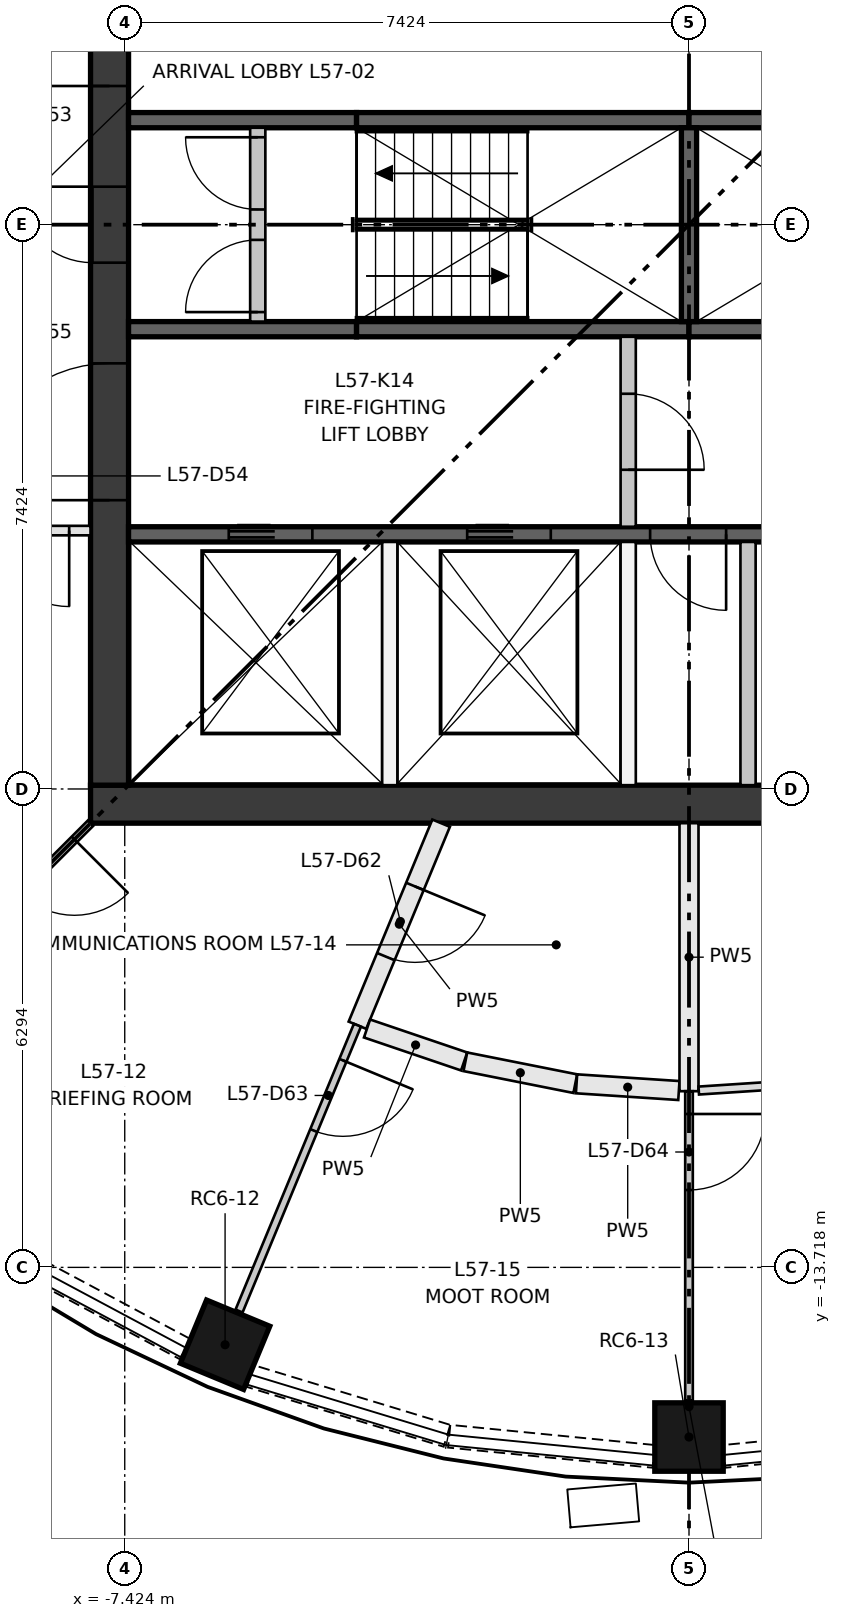
"""IFC4 building model, lengths in metres.
Left out: names, types, materials, properties, quantities, classifications, styles, units other than length and angle.
Written with IfcOpenShell. Run it as: python <this file> out.ifc"""

import sys

from ifc_helpers import new_model, si_unit, direction, frame, frame_2d, origin, origin_2d, place, context, subcontext, project, spatial, rectangle, extrude, element, fill, save


model = new_model("IFC4")
c1 = context("Model", 3, precision=1e-05, world=origin(), true_north=direction((0.0, 1.0)))
c2 = subcontext(c1, "Body", "Model", "MODEL_VIEW")
j1 = project(units=[si_unit("LENGTHUNIT", "METRE"), si_unit("PLANEANGLEUNIT", "RADIAN")], contexts=[c1])
p1 = place(None, origin())
s1 = spatial("IfcSite", under=j1, at=p1, CompositionType="ELEMENT")
p2 = place(p1, origin())
s2 = spatial("IfcBuilding", under=s1, at=p2, CompositionType="ELEMENT")
p3 = place(p2, frame((0.0, 0.0, 211.1)))
s3 = spatial("IfcBuildingStorey", under=s2, at=p3, CompositionType="ELEMENT", Elevation=211.1)
for number, where, z_axis, x_axis in (
    (1, (-6.104, -14.736, 0.0), (0.0, 0.0, 1.0), (-0.383, -0.924, 0.0)),
    (2, (0.0, -15.95, 0.0), (0.0, 0.0, 1.0), (0.0, -1.0, 0.0)),
):
    element("IfcColumn", number, at=place(p3, frame(where, z_axis=z_axis, x_axis=x_axis)), inside=s3, PredefinedType="COLUMN", context=c2, shape_type="SweptSolid", body=[
        extrude(rectangle(XDim=0.9, YDim=0.9, at=origin_2d()), origin(), (0.0, 0.0, 1.0), 2.85),
    ])
p4 = place(p3, frame((-7.874, -7.624, 0.0), z_axis=(0.0, 0.0, 1.0), x_axis=(1.0, 0.0, 0.0)))
e3 = element("IfcWall", 3, at=p4, inside=s3, PredefinedType="SHEAR", context=c2, shape_type="SweptSolid", body=[
    extrude(rectangle(XDim=15.748, YDim=0.5, at=frame_2d((7.874, 0.0))), origin(), (0.0, 0.0, 1.0), 3.35),
])
p5 = place(p3, frame((-7.624, -7.374, 0.0), z_axis=(0.0, 0.0, 1.0), x_axis=(0.0, 1.0, 0.0)))
e4 = element("IfcWall", 4, at=p5, inside=s3, PredefinedType="SHEAR", context=c2, shape_type="SweptSolid", body=[
    extrude(rectangle(XDim=14.748, YDim=0.5, at=frame_2d((7.374, 0.0))), origin(), (0.0, 0.0, 1.0), 3.35),
])
p6 = place(p5, frame((6.874, 0.0, 0.0)))
e5 = element("IfcOpeningElement", 5, at=p6, cuts=e4, PredefinedType="OPENING", context=c2, shape_type="SweptSolid", body=[
    extrude(rectangle(XDim=1.0, YDim=2.1, at=frame_2d((0.5, 1.05))), frame((0.0, 0.26, 0.0), z_axis=(0.0, -1.0, 0.0), x_axis=(1.0, 0.0, 0.0)), (0.0, 0.0, 1.0), 0.52),
])
p7 = place(p5, frame((3.75, 0.0, 0.0)))
e6 = element("IfcOpeningElement", 6, at=p7, cuts=e4, PredefinedType="OPENING", context=c2, shape_type="SweptSolid", body=[
    extrude(rectangle(XDim=1.8, YDim=2.1, at=frame_2d((0.9, 1.05))), frame((0.0, 0.26, 0.0), z_axis=(0.0, -1.0, 0.0), x_axis=(1.0, 0.0, 0.0)), (0.0, 0.0, 1.0), 0.52),
])
p8 = place(p5, frame((9.198, 0.0, 0.0)))
e7 = element("IfcOpeningElement", 7, at=p8, cuts=e4, PredefinedType="OPENING", context=c2, shape_type="SweptSolid", body=[
    extrude(rectangle(XDim=1.8, YDim=2.1, at=frame_2d((0.9, 1.05))), frame((0.0, 0.26, 0.0), z_axis=(0.0, -1.0, 0.0), x_axis=(1.0, 0.0, 0.0)), (0.0, 0.0, 1.0), 0.52),
])
p9 = place(p3, frame((-7.374, -4.074, 0.0), z_axis=(0.0, 0.0, 1.0), x_axis=(1.0, 0.0, 0.0)))
e8 = element("IfcWall", 8, at=p9, inside=s3, PredefinedType="SHEAR", context=c2, shape_type="SweptSolid", body=[
    extrude(rectangle(XDim=14.748, YDim=0.2, at=frame_2d((7.374, 0.0))), origin(), (0.0, 0.0, 1.0), 3.0),
])
p10 = place(p9, frame((1.319, 0.0, 0.0)))
e9 = element("IfcOpeningElement", 9, at=p10, cuts=e8, PredefinedType="OPENING", context=c2, shape_type="SweptSolid", body=[
    extrude(rectangle(XDim=1.1, YDim=2.1, at=frame_2d((0.55, 1.05))), frame((0.0, 0.11, 0.0), z_axis=(0.0, -1.0, 0.0), x_axis=(1.0, 0.0, 0.0)), (0.0, 0.0, 1.0), 0.22),
])
p11 = place(p9, frame((4.456, 0.0, 0.0)))
e10 = element("IfcOpeningElement", 10, at=p11, cuts=e8, PredefinedType="OPENING", context=c2, shape_type="SweptSolid", body=[
    extrude(rectangle(XDim=1.1, YDim=2.1, at=frame_2d((0.55, 1.05))), frame((0.0, 0.11, 0.0), z_axis=(0.0, -1.0, 0.0), x_axis=(1.0, 0.0, 0.0)), (0.0, 0.0, 1.0), 0.22),
])
p12 = place(p9, frame((6.862, 0.0, 0.0)))
e11 = element("IfcOpeningElement", 11, at=p12, cuts=e8, PredefinedType="OPENING", context=c2, shape_type="SweptSolid", body=[
    extrude(rectangle(XDim=1.0, YDim=2.1, at=frame_2d((0.5, 1.05))), frame((0.0, 0.11, 0.0), z_axis=(0.0, -1.0, 0.0), x_axis=(1.0, 0.0, 0.0)), (0.0, 0.0, 1.0), 0.22),
])
p13 = place(p9, frame((8.439, 0.0, 0.0)))
e12 = element("IfcOpeningElement", 12, at=p13, cuts=e8, PredefinedType="OPENING", context=c2, shape_type="SweptSolid", body=[
    extrude(rectangle(XDim=1.0, YDim=2.1, at=frame_2d((0.5, 1.05))), frame((0.0, 0.11, 0.0), z_axis=(0.0, -1.0, 0.0), x_axis=(1.0, 0.0, 0.0)), (0.0, 0.0, 1.0), 0.22),
])
p14 = place(p9, frame((10.509, 0.0, 0.0)))
e13 = element("IfcOpeningElement", 13, at=p14, cuts=e8, PredefinedType="OPENING", context=c2, shape_type="SweptSolid", body=[
    extrude(rectangle(XDim=0.8, YDim=2.1, at=frame_2d((0.4, 1.05))), frame((0.0, 0.11, 0.0), z_axis=(0.0, -1.0, 0.0), x_axis=(1.0, 0.0, 0.0)), (0.0, 0.0, 1.0), 0.22),
])
p15 = place(p9, frame((12.969, 0.0, 0.0)))
e14 = element("IfcOpeningElement", 14, at=p15, cuts=e8, PredefinedType="OPENING", context=c2, shape_type="SweptSolid", body=[
    extrude(rectangle(XDim=1.0, YDim=2.1, at=frame_2d((0.5, 1.05))), frame((0.0, 0.11, 0.0), z_axis=(0.0, -1.0, 0.0), x_axis=(1.0, 0.0, 0.0)), (0.0, 0.0, 1.0), 0.22),
])
p16 = place(p3, frame((-7.374, -1.375, 0.0), z_axis=(0.0, 0.0, 1.0), x_axis=(1.0, 0.0, 0.0)))
e15 = element("IfcWall", 15, at=p16, inside=s3, PredefinedType="SHEAR", context=c2, shape_type="SweptSolid", body=[
    extrude(rectangle(XDim=3.0, YDim=0.2, at=frame_2d((1.5, 0.0))), origin(), (0.0, 0.0, 1.0), 3.0),
])
for number, where, z_axis, x_axis in (
    (16, (-4.374, -1.375, 0.0), (0.0, 0.0, 1.0), (1.0, 0.0, 0.0)),
    (17, (0.0, -1.375, 0.0), (0.0, 0.0, 1.0), (1.0, 0.0, 0.0)),
):
    element("IfcWall", number, at=place(p3, frame(where, z_axis=z_axis, x_axis=x_axis)), inside=s3, PredefinedType="SHEAR", context=c2, shape_type="SweptSolid", body=[
        extrude(rectangle(XDim=4.374, YDim=0.2, at=frame_2d((2.187, 0.0))), origin(), (0.0, 0.0, 1.0), 3.0),
    ])
p17 = place(p3, frame((-7.374, 1.375, 0.0), z_axis=(0.0, 0.0, 1.0), x_axis=(1.0, 0.0, 0.0)))
e18 = element("IfcWall", 18, at=p17, inside=s3, PredefinedType="SHEAR", context=c2, shape_type="SweptSolid", body=[
    extrude(rectangle(XDim=3.0, YDim=0.2, at=frame_2d((1.5, 0.0))), origin(), (0.0, 0.0, 1.0), 3.0),
])
for number, where, z_axis, x_axis in (
    (19, (-4.374, 1.375, 0.0), (0.0, 0.0, 1.0), (1.0, 0.0, 0.0)),
    (20, (0.0, 1.375, 0.0), (0.0, 0.0, 1.0), (1.0, 0.0, 0.0)),
):
    element("IfcWall", number, at=place(p3, frame(where, z_axis=z_axis, x_axis=x_axis)), inside=s3, PredefinedType="SHEAR", context=c2, shape_type="SweptSolid", body=[
        extrude(rectangle(XDim=4.374, YDim=0.2, at=frame_2d((2.187, 0.0))), origin(), (0.0, 0.0, 1.0), 3.0),
    ])
p18 = place(p3, frame((0.0, -1.275, 0.0), z_axis=(0.0, 0.0, 1.0), x_axis=(0.0, 1.0, 0.0)))
e21 = element("IfcWall", 21, at=p18, inside=s3, PredefinedType="SHEAR", context=c2, shape_type="SweptSolid", body=[
    extrude(rectangle(XDim=2.55, YDim=0.2, at=frame_2d((1.275, 0.0))), origin(), (0.0, 0.0, 1.0), 3.0),
])
for number, where, z_axis, x_axis in (
    (22, (-3.937, -7.374, 0.0), (0.0, 0.0, 1.0), (0.0, 1.0, 0.0)),
    (23, (-0.8, -7.374, 0.0), (0.0, 0.0, 1.0), (0.0, 1.0, 0.0)),
):
    element("IfcWall", number, at=place(p3, frame(where, z_axis=z_axis, x_axis=x_axis)), inside=s3, PredefinedType="PARTITIONING", context=c2, shape_type="SweptSolid", body=[
        extrude(rectangle(XDim=3.2, YDim=0.2, at=frame_2d((1.6, 0.0))), origin(), (0.0, 0.0, 1.0), 3.0),
    ])
p19 = place(p3, frame((-0.8, -3.974, 0.0), z_axis=(0.0, 0.0, 1.0), x_axis=(0.0, 1.0, 0.0)))
e24 = element("IfcWall", 24, at=p19, inside=s3, PredefinedType="PARTITIONING", context=c2, shape_type="SweptSolid", body=[
    extrude(rectangle(XDim=2.499, YDim=0.2, at=frame_2d((1.25, 0.0))), origin(), (0.0, 0.0, 1.0), 3.0),
])
p20 = place(p19, frame((0.75, 0.0, 0.0)))
e25 = element("IfcOpeningElement", 25, at=p20, cuts=e24, PredefinedType="OPENING", context=c2, shape_type="SweptSolid", body=[
    extrude(rectangle(XDim=1.0, YDim=2.1, at=frame_2d((0.5, 1.05))), frame((0.0, 0.11, 0.0), z_axis=(0.0, -1.0, 0.0), x_axis=(1.0, 0.0, 0.0)), (0.0, 0.0, 1.0), 0.22),
])
p21 = place(p3, frame((0.777, -7.374, 0.0), z_axis=(0.0, 0.0, 1.0), x_axis=(0.0, 1.0, 0.0)))
e26 = element("IfcWall", 26, at=p21, inside=s3, PredefinedType="PARTITIONING", context=c2, shape_type="SweptSolid", body=[
    extrude(rectangle(XDim=3.2, YDim=0.2, at=frame_2d((1.6, 0.0))), origin(), (0.0, 0.0, 1.0), 3.0),
])
p22 = place(p3, frame((-5.674, -1.275, 0.0), z_axis=(0.0, 0.0, 1.0), x_axis=(0.0, 1.0, 0.0)))
e27 = element("IfcWall", 27, at=p22, inside=s3, PredefinedType="PARTITIONING", context=c2, shape_type="SweptSolid", body=[
    extrude(rectangle(XDim=2.55, YDim=0.2, at=frame_2d((1.275, 0.0))), origin(), (0.0, 0.0, 1.0), 3.0),
])
p23 = place(p22, frame((0.125, 0.0, 0.0)))
e28 = element("IfcOpeningElement", 28, at=p23, cuts=e27, PredefinedType="OPENING", context=c2, shape_type="SweptSolid", body=[
    extrude(rectangle(XDim=0.95, YDim=2.1, at=frame_2d((0.475, 1.05))), frame((0.0, 0.11, 0.0), z_axis=(0.0, -1.0, 0.0), x_axis=(1.0, 0.0, 0.0)), (0.0, 0.0, 1.0), 0.22),
])
p24 = place(p22, frame((1.475, 0.0, 0.0)))
e29 = element("IfcOpeningElement", 29, at=p24, cuts=e27, PredefinedType="OPENING", context=c2, shape_type="SweptSolid", body=[
    extrude(rectangle(XDim=0.95, YDim=2.1, at=frame_2d((0.475, 1.05))), frame((0.0, 0.11, 0.0), z_axis=(0.0, -1.0, 0.0), x_axis=(1.0, 0.0, 0.0)), (0.0, 0.0, 1.0), 0.22),
])
p25 = place(p3, frame((-9.015, -13.518, 0.0), z_axis=(0.0, 0.0, 1.0), x_axis=(0.881887660835, -0.471459599189, 0.0)))
e30 = element("IfcWall", 30, at=p25, inside=s3, PredefinedType="SOLIDWALL", context=c2, shape_type="SweptSolid", body=[
    extrude(rectangle(XDim=2.704, YDim=0.3, at=frame_2d((1.352, 0.0))), origin(), (0.0, 0.0, 1.0), 0.9),
])
p26 = place(p3, frame((-5.773, -15.147, 0.0), z_axis=(0.0, 0.0, 1.0), x_axis=(0.956842043529, -0.290608505958, 0.0)))
e31 = element("IfcWall", 31, at=p26, inside=s3, PredefinedType="SOLIDWALL", context=c2, shape_type="SweptSolid", body=[
    extrude(rectangle(XDim=2.705, YDim=0.3, at=frame_2d((1.353, 0.0))), origin(), (0.0, 0.0, 1.0), 0.9),
])
for number, where, z_axis, x_axis in (
    (32, (-3.155, -15.939, 0.0), (0.0, 0.0, 1.0), (0.995, -0.098, 0.0)),
    (33, (0.464, -16.205, 0.0), (0.0, 0.0, 1.0), (0.995, 0.098, 0.0)),
):
    element("IfcWall", number, at=place(p3, frame(where, z_axis=z_axis, x_axis=x_axis)), inside=s3, PredefinedType="SOLIDWALL", context=c2, shape_type="SweptSolid", body=[
        extrude(rectangle(XDim=2.704, YDim=0.3, at=frame_2d((1.352, 0.0))), origin(), (0.0, 0.0, 1.0), 0.9),
    ])
p27 = place(p3, frame((-7.874, -4.024, 0.0), z_axis=(0.0, 0.0, 1.0), x_axis=(-1.0, 0.0, 0.0)))
e34 = element("IfcWall", 34, at=p27, inside=s3, PredefinedType="PARTITIONING", context=c2, shape_type="SweptSolid", body=[
    extrude(rectangle(XDim=1.562, YDim=0.125, at=frame_2d((0.781, 0.0))), origin(), (0.0, 0.0, 1.0), 3.0),
])
p28 = place(p27, frame((0.281, 0.0, 0.0)))
e35 = element("IfcOpeningElement", 35, at=p28, cuts=e34, PredefinedType="OPENING", context=c2, shape_type="SweptSolid", body=[
    extrude(rectangle(XDim=1.0, YDim=2.1, at=frame_2d((0.5, 1.05))), frame((0.0, 0.073, 0.0), z_axis=(0.0, -1.0, 0.0), x_axis=(1.0, 0.0, 0.0)), (0.0, 0.0, 1.0), 0.145),
])
p29 = place(p3, frame((-7.874, -7.874, 0.0), z_axis=(0.0, 0.0, 1.0), x_axis=(-0.707106781187, -0.707106781187, 0.0)))
e36 = element("IfcWall", 36, at=p29, inside=s3, PredefinedType="PARTITIONING", context=c2, shape_type="SweptSolid", body=[
    extrude(rectangle(XDim=4.334, YDim=0.1, at=frame_2d((2.167, 0.0))), origin(), (0.0, 0.0, 1.0), 3.0),
])
p30 = place(p29, frame((0.3, 0.0, 0.0)))
e37 = element("IfcOpeningElement", 37, at=p30, cuts=e36, PredefinedType="OPENING", context=c2, shape_type="SweptSolid", body=[
    extrude(rectangle(XDim=1.0, YDim=2.1, at=frame_2d((0.5, 1.05))), frame((0.0, 0.06, 0.0), z_axis=(0.0, -1.0, 0.0), x_axis=(1.0, 0.0, 0.0)), (0.0, 0.0, 1.0), 0.12),
])
p31 = place(p3, frame((-3.261, -7.874, 0.0), z_axis=(0.0, 0.0, 1.0), x_axis=(-0.382686527355, -0.923878250519, 0.0)))
e38 = element("IfcWall", 38, at=p31, inside=s3, PredefinedType="PARTITIONING", context=c2, shape_type="SweptSolid", body=[
    extrude(rectangle(XDim=2.877, YDim=0.25, at=frame_2d((1.438, 0.0))), origin(), (0.0, 0.0, 1.0), 3.0),
])
p32 = place(p31, frame((0.9, 0.0, 0.0)))
e39 = element("IfcOpeningElement", 39, at=p32, cuts=e38, PredefinedType="OPENING", context=c2, shape_type="SweptSolid", body=[
    extrude(rectangle(XDim=1.0, YDim=2.1, at=frame_2d((0.5, 1.05))), frame((0.0, 0.135, 0.0), z_axis=(0.0, -1.0, 0.0), x_axis=(1.0, 0.0, 0.0)), (0.0, 0.0, 1.0), 0.27),
])
p33 = place(p3, frame((-4.363, -10.532, 0.0), z_axis=(0.0, 0.0, 1.0), x_axis=(-0.382697907061, -0.923873536763, 0.0)))
e40 = element("IfcWall", 40, at=p33, inside=s3, PredefinedType="PARTITIONING", context=c2, shape_type="SweptSolid", body=[
    extrude(rectangle(XDim=4.07, YDim=0.1, at=frame_2d((2.035, 0.0))), origin(), (0.0, 0.0, 1.0), 3.0),
])
p34 = place(p33, frame((0.5, 0.0, 0.0)))
e41 = element("IfcOpeningElement", 41, at=p34, cuts=e40, PredefinedType="OPENING", context=c2, shape_type="SweptSolid", body=[
    extrude(rectangle(XDim=1.0, YDim=2.1, at=frame_2d((0.5, 1.05))), frame((0.0, 0.06, 0.0), z_axis=(0.0, -1.0, 0.0), x_axis=(1.0, 0.0, 0.0)), (0.0, 0.0, 1.0), 0.12),
])
p35 = place(p3, frame((-2.958, -11.009, 0.0), z_axis=(0.0, 0.0, 1.0), x_axis=(-0.946913805822, 0.321487549283, 0.0)))
e42 = element("IfcWall", 42, at=p35, inside=s3, PredefinedType="PARTITIONING", context=c2, shape_type="SweptSolid", body=[
    extrude(rectangle(XDim=1.349, YDim=0.25, at=frame_2d((0.675, 0.0))), origin(), (0.0, 0.0, 1.0), 3.0),
])
p36 = place(p3, frame((-1.496, -11.301, 0.0), z_axis=(0.0, 0.0, 1.0), x_axis=(-0.980796583917, 0.195033486809, 0.0)))
e43 = element("IfcWall", 43, at=p36, inside=s3, PredefinedType="PARTITIONING", context=c2, shape_type="SweptSolid", body=[
    extrude(rectangle(XDim=1.475, YDim=0.25, at=frame_2d((0.737, 0.0))), origin(), (0.0, 0.0, 1.0), 3.0),
])
p37 = place(p3, frame((-0.133, -11.391, 0.0), z_axis=(0.0, 0.0, 1.0), x_axis=(-0.997852686239, 0.065498218027, 0.0)))
e44 = element("IfcWall", 44, at=p37, inside=s3, PredefinedType="PARTITIONING", context=c2, shape_type="SweptSolid", body=[
    extrude(rectangle(XDim=1.349, YDim=0.25, at=frame_2d((0.675, 0.0))), origin(), (0.0, 0.0, 1.0), 3.0),
])
p38 = place(p3, frame((0.0, -7.874, 0.0), z_axis=(0.0, 0.0, 1.0), x_axis=(0.0, -1.0, 0.0)))
e45 = element("IfcWall", 45, at=p38, inside=s3, PredefinedType="PARTITIONING", context=c2, shape_type="SweptSolid", body=[
    extrude(rectangle(XDim=3.526, YDim=0.25, at=frame_2d((1.763, 0.0))), origin(), (0.0, 0.0, 1.0), 3.0),
])
p39 = place(p3, frame((0.0, -11.4, 0.0), z_axis=(0.0, 0.0, 1.0), x_axis=(0.0, -1.0, 0.0)))
e46 = element("IfcWall", 46, at=p39, inside=s3, PredefinedType="PARTITIONING", context=c2, shape_type="SweptSolid", body=[
    extrude(rectangle(XDim=4.07, YDim=0.1, at=frame_2d((2.035, 0.0))), origin(), (0.0, 0.0, 1.0), 3.0),
])
p40 = place(p39, frame((0.3, 0.0, 0.0)))
e47 = element("IfcOpeningElement", 47, at=p40, cuts=e46, PredefinedType="OPENING", context=c2, shape_type="SweptSolid", body=[
    extrude(rectangle(XDim=1.0, YDim=2.1, at=frame_2d((0.5, 1.05))), frame((0.0, 0.06, 0.0), z_axis=(0.0, -1.0, 0.0), x_axis=(1.0, 0.0, 0.0)), (0.0, 0.0, 1.0), 0.12),
])
p41 = place(p3, frame((1.485, -11.303, 0.0), z_axis=(0.0, 0.0, 1.0), x_axis=(-0.997860024345, -0.065386327428, 0.0)))
e48 = element("IfcWall", 48, at=p41, inside=s3, PredefinedType="PARTITIONING", context=c2, shape_type="SweptSolid", body=[
    extrude(rectangle(XDim=1.359, YDim=0.105, at=frame_2d((0.68, 0.0))), origin(), (0.0, 0.0, 1.0), 3.0),
])
p42 = place(p10, origin())
e49 = element("IfcDoor", 49, at=p42, inside=s3, OperationType="DOUBLE_DOOR_SLIDING", PredefinedType="DOOR", context=c2, shape_type="SweptSolid", body=[
    extrude(rectangle(XDim=1.1, YDim=2.1, at=frame_2d((0.55, 1.05))), frame((0.0, 0.025, 0.0), z_axis=(0.0, -1.0, 0.0), x_axis=(1.0, 0.0, 0.0)), (0.0, 0.0, 1.0), 0.05),
])
fill(e9, e49)
p43 = place(p11, origin())
e50 = element("IfcDoor", 50, at=p43, inside=s3, OperationType="DOUBLE_DOOR_SLIDING", PredefinedType="DOOR", context=c2, shape_type="SweptSolid", body=[
    extrude(rectangle(XDim=1.1, YDim=2.1, at=frame_2d((0.55, 1.05))), frame((0.0, 0.025, 0.0), z_axis=(0.0, -1.0, 0.0), x_axis=(1.0, 0.0, 0.0)), (0.0, 0.0, 1.0), 0.05),
])
fill(e10, e50)
p44 = place(p23, origin())
e51 = element("IfcDoor", 51, at=p44, inside=s3, OperationType="SINGLE_SWING_LEFT", PredefinedType="DOOR", context=c2, shape_type="SweptSolid", body=[
    extrude(rectangle(XDim=0.95, YDim=2.1, at=frame_2d((0.475, 1.05))), frame((0.0, 0.025, 0.0), z_axis=(0.0, -1.0, 0.0), x_axis=(1.0, 0.0, 0.0)), (0.0, 0.0, 1.0), 0.05),
])
fill(e28, e51)
p45 = place(p24, origin())
e52 = element("IfcDoor", 52, at=p45, inside=s3, OperationType="SINGLE_SWING_RIGHT", PredefinedType="DOOR", context=c2, shape_type="SweptSolid", body=[
    extrude(rectangle(XDim=0.95, YDim=2.1, at=frame_2d((0.475, 1.05))), frame((0.0, 0.025, 0.0), z_axis=(0.0, -1.0, 0.0), x_axis=(1.0, 0.0, 0.0)), (0.0, 0.0, 1.0), 0.05),
])
fill(e29, e52)
p46 = place(p20, frame((1.0, 0.0, 0.0), z_axis=(0.0, 0.0, 1.0), x_axis=(-1.0, 0.0, 0.0)))
e53 = element("IfcDoor", 53, at=p46, inside=s3, OperationType="SINGLE_SWING_LEFT", PredefinedType="DOOR", context=c2, shape_type="SweptSolid", body=[
    extrude(rectangle(XDim=1.0, YDim=2.1, at=frame_2d((0.5, 1.05))), frame((0.0, 0.025, 0.0), z_axis=(0.0, -1.0, 0.0), x_axis=(1.0, 0.0, 0.0)), (0.0, 0.0, 1.0), 0.05),
])
fill(e25, e53)
p47 = place(p12, frame((1.0, 0.0, 0.0), z_axis=(0.0, 0.0, 1.0), x_axis=(-1.0, 0.0, 0.0)))
e54 = element("IfcDoor", 54, at=p47, inside=s3, OperationType="SINGLE_SWING_RIGHT", PredefinedType="DOOR", context=c2, shape_type="SweptSolid", body=[
    extrude(rectangle(XDim=1.0, YDim=2.1, at=frame_2d((0.5, 1.05))), frame((0.0, 0.025, 0.0), z_axis=(0.0, -1.0, 0.0), x_axis=(1.0, 0.0, 0.0)), (0.0, 0.0, 1.0), 0.05),
])
fill(e11, e54)
p48 = place(p6, origin())
e55 = element("IfcDoor", 55, at=p48, inside=s3, OperationType="SINGLE_SWING_RIGHT", PredefinedType="DOOR", context=c2, shape_type="SweptSolid", body=[
    extrude(rectangle(XDim=1.0, YDim=2.1, at=frame_2d((0.5, 1.05))), frame((0.0, 0.25, 0.0), z_axis=(0.0, -1.0, 0.0), x_axis=(1.0, 0.0, 0.0)), (0.0, 0.0, 1.0), 0.05),
])
fill(e5, e55)
p49 = place(p7, origin())
e56 = element("IfcDoor", 56, at=p49, inside=s3, OperationType="DOUBLE_DOOR_SINGLE_SWING", PredefinedType="DOOR", context=c2, shape_type="SweptSolid", body=[
    extrude(rectangle(XDim=1.8, YDim=2.1, at=frame_2d((0.9, 1.05))), frame((0.0, 0.025, 0.0), z_axis=(0.0, -1.0, 0.0), x_axis=(1.0, 0.0, 0.0)), (0.0, 0.0, 1.0), 0.05),
])
fill(e6, e56)
p50 = place(p8, origin())
e57 = element("IfcDoor", 57, at=p50, inside=s3, OperationType="DOUBLE_DOOR_SINGLE_SWING", PredefinedType="DOOR", context=c2, shape_type="SweptSolid", body=[
    extrude(rectangle(XDim=1.8, YDim=2.1, at=frame_2d((0.9, 1.05))), frame((0.0, 0.025, 0.0), z_axis=(0.0, -1.0, 0.0), x_axis=(1.0, 0.0, 0.0)), (0.0, 0.0, 1.0), 0.05),
])
fill(e7, e57)
p51 = place(p28, origin())
e58 = element("IfcDoor", 58, at=p51, inside=s3, OperationType="SINGLE_SWING_LEFT", PredefinedType="DOOR", context=c2, shape_type="SweptSolid", body=[
    extrude(rectangle(XDim=1.0, YDim=2.1, at=frame_2d((0.5, 1.05))), frame((0.0, 0.025, 0.0), z_axis=(0.0, -1.0, 0.0), x_axis=(1.0, 0.0, 0.0)), (0.0, 0.0, 1.0), 0.05),
])
fill(e35, e58)
p52 = place(p30, origin())
e59 = element("IfcDoor", 59, at=p52, inside=s3, OperationType="SINGLE_SWING_LEFT", PredefinedType="DOOR", context=c2, shape_type="SweptSolid", body=[
    extrude(rectangle(XDim=1.0, YDim=2.1, at=frame_2d((0.5, 1.05))), frame((0.0, 0.025, 0.0), z_axis=(0.0, -1.0, 0.0), x_axis=(1.0, 0.0, 0.0)), (0.0, 0.0, 1.0), 0.05),
])
fill(e37, e59)
p53 = place(p32, origin())
e60 = element("IfcDoor", 60, at=p53, inside=s3, OperationType="SINGLE_SWING_LEFT", PredefinedType="DOOR", context=c2, shape_type="SweptSolid", body=[
    extrude(rectangle(XDim=1.0, YDim=2.1, at=frame_2d((0.5, 1.05))), frame((0.0, 0.025, 0.0), z_axis=(0.0, -1.0, 0.0), x_axis=(1.0, 0.0, 0.0)), (0.0, 0.0, 1.0), 0.05),
])
fill(e39, e60)
p54 = place(p34, origin())
e61 = element("IfcDoor", 61, at=p54, inside=s3, OperationType="SINGLE_SWING_LEFT", PredefinedType="DOOR", context=c2, shape_type="SweptSolid", body=[
    extrude(rectangle(XDim=1.0, YDim=2.1, at=frame_2d((0.5, 1.05))), frame((0.0, 0.025, 0.0), z_axis=(0.0, -1.0, 0.0), x_axis=(1.0, 0.0, 0.0)), (0.0, 0.0, 1.0), 0.05),
])
fill(e41, e61)
p55 = place(p40, origin())
e62 = element("IfcDoor", 62, at=p55, inside=s3, OperationType="SINGLE_SWING_LEFT", PredefinedType="DOOR", context=c2, shape_type="SweptSolid", body=[
    extrude(rectangle(XDim=1.0, YDim=2.1, at=frame_2d((0.5, 1.05))), frame((0.0, 0.025, 0.0), z_axis=(0.0, -1.0, 0.0), x_axis=(1.0, 0.0, 0.0)), (0.0, 0.0, 1.0), 0.05),
])
fill(e47, e62)
save(model, sys.argv[1])
